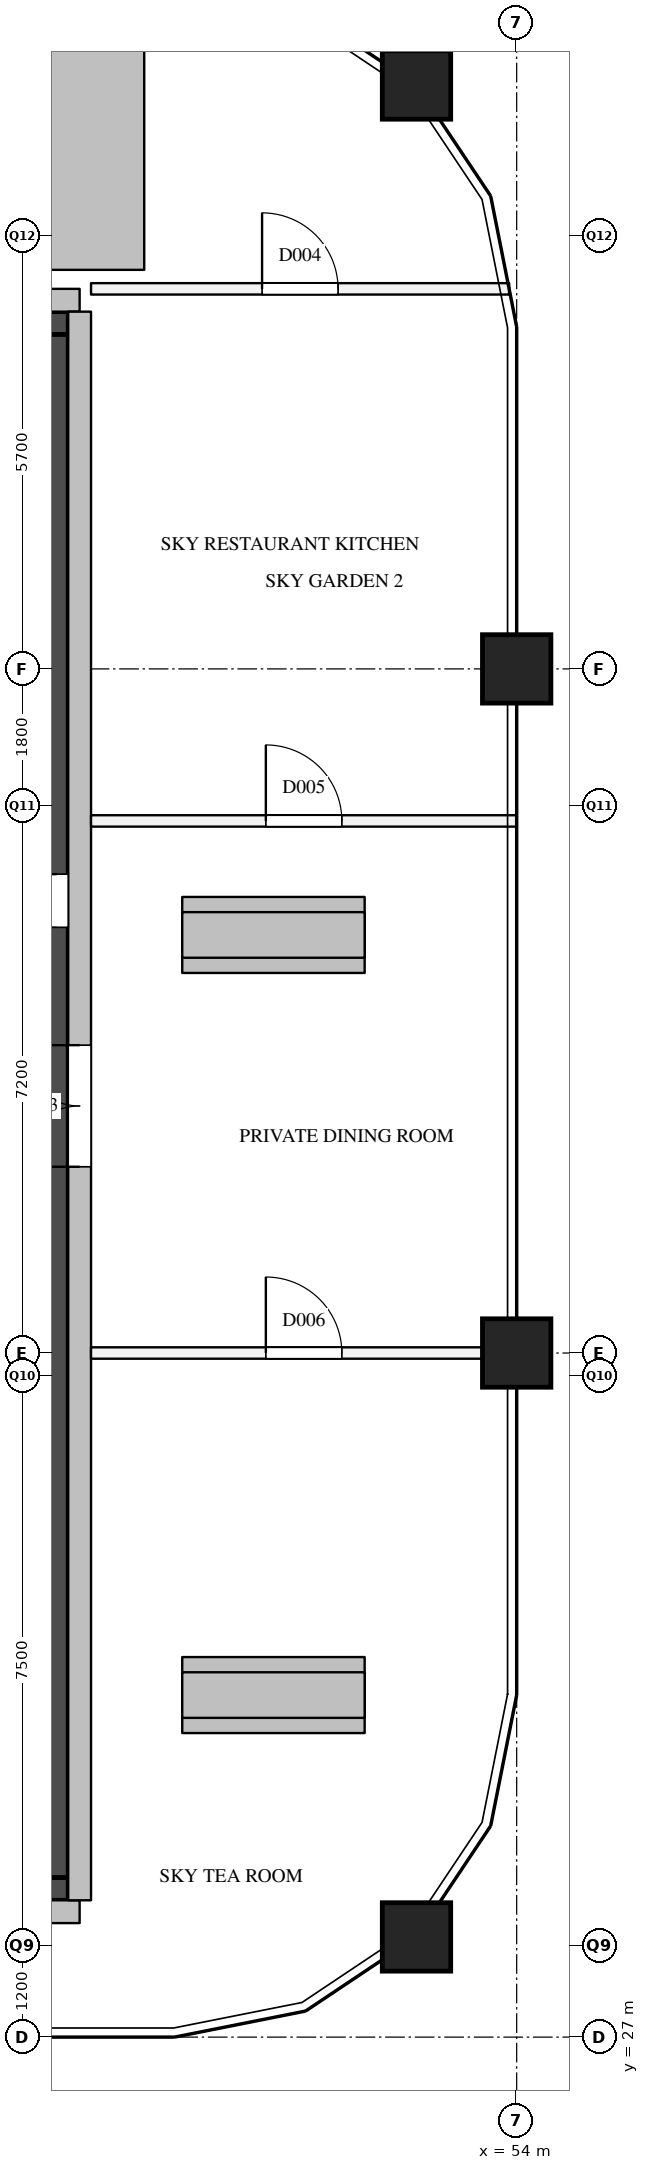
"""IFC4 building model, lengths in metres.
Left out: names, types, materials, properties, quantities, classifications, styles, units other than length and angle.
Written with IfcOpenShell. Run it as: python <this file> out.ifc"""

import sys

from ifc_helpers import new_model, si_unit, direction, frame, frame_2d, origin, origin_2d, place, context, subcontext, project, spatial, rectangle, extrude, element, fill, save


model = new_model("IFC4")
c1 = context("Model", 3, precision=1e-05, world=origin(), true_north=direction((0.0, 1.0)))
c2 = subcontext(c1, "Body", "Model", "MODEL_VIEW")
j1 = project(units=[si_unit("LENGTHUNIT", "METRE"), si_unit("PLANEANGLEUNIT", "RADIAN")], contexts=[c1])
p1 = place(None, origin())
s1 = spatial("IfcSite", under=j1, at=p1, CompositionType="ELEMENT")
p2 = place(p1, origin())
s2 = spatial("IfcBuilding", under=s1, at=p2, CompositionType="ELEMENT")
p3 = place(p2, frame((0.0, 0.0, 320.7)))
s3 = spatial("IfcBuildingStorey", under=s2, at=p3, CompositionType="ELEMENT", Elevation=320.7)
for number, where, z_axis, x_axis in (
    (1, (52.682, 28.318, 0.0), (0.0, 0.0, 1.0), (1.0, 0.0, 0.0)),
    (2, (54.0, 36.0, 0.0), (0.0, 0.0, 1.0), (1.0, 0.0, 0.0)),
    (3, (54.0, 45.0, 0.0), (0.0, 0.0, 1.0), (1.0, 0.0, 0.0)),
    (4, (52.682, 52.682, 0.0), (0.0, 0.0, 1.0), (1.0, 0.0, 0.0)),
):
    element("IfcColumn", number, at=place(p3, frame(where, z_axis=z_axis, x_axis=x_axis)), inside=s3, PredefinedType="COLUMN", context=c2, shape_type="SweptSolid", body=[
        extrude(rectangle(XDim=0.9, YDim=0.9, at=origin_2d()), origin(), (0.0, 0.0, 1.0), 4.5),
    ])
p4 = place(p3, frame((49.6, 31.5, 4.5), z_axis=(0.0, 0.0, 1.0), x_axis=(1.0, 0.0, 0.0)))
e5 = element("IfcWall", 5, at=p4, inside=s3, PredefinedType="SOLIDWALL", context=c2, shape_type="SweptSolid", body=[
    extrude(rectangle(XDim=2.4, YDim=1.0, at=frame_2d((1.2, 0.0))), origin(), (0.0, 0.0, 1.0), 0.45),
])
p5 = place(p3, frame((49.6, 41.5, 4.5), z_axis=(0.0, 0.0, 1.0), x_axis=(1.0, 0.0, 0.0)))
e6 = element("IfcWall", 6, at=p5, inside=s3, PredefinedType="SOLIDWALL", context=c2, shape_type="SweptSolid", body=[
    extrude(rectangle(XDim=2.4, YDim=1.0, at=frame_2d((1.2, 0.0))), origin(), (0.0, 0.0, 1.0), 1.35),
])
p6 = place(p3, frame((45.5, 51.75, 5.1), z_axis=(0.0, 0.0, 1.0), x_axis=(1.0, 0.0, 0.0)))
e7 = element("IfcWall", 7, at=p6, inside=s3, PredefinedType="SOLIDWALL", context=c2, shape_type="SweptSolid", body=[
    extrude(rectangle(XDim=3.6, YDim=3.0, at=frame_2d((1.8, 0.0))), origin(), (0.0, 0.0, 1.0), 2.6),
])
for number, where, z_axis, x_axis in (
    (8, (36.15, 28.65, 4.5), (0.0, 0.0, 1.0), (1.0, 0.0, 0.0)),
    (9, (36.15, 49.85, 4.5), (0.0, 0.0, 1.0), (1.0, 0.0, 0.0)),
):
    element("IfcWall", number, at=place(p3, frame(where, z_axis=z_axis, x_axis=x_axis)), inside=s3, PredefinedType="SOLIDWALL", context=c2, shape_type="SweptSolid", body=[
        extrude(rectangle(XDim=12.1, YDim=0.3, at=frame_2d((6.05, 0.0))), origin(), (0.0, 0.0, 1.0), 3.6),
    ])
p7 = place(p3, frame((48.25, 28.8, 4.5), z_axis=(0.0, 0.0, 1.0), x_axis=(0.0, 1.0, 0.0)))
e10 = element("IfcWall", 10, at=p7, inside=s3, PredefinedType="SOLIDWALL", context=c2, shape_type="SweptSolid", body=[
    extrude(rectangle(XDim=20.9, YDim=0.3, at=frame_2d((10.45, 0.0))), origin(), (0.0, 0.0, 1.0), 3.6),
])
p8 = place(p7, frame((9.65, 0.0, 0.0)))
e11 = element("IfcOpeningElement", 11, at=p8, cuts=e10, PredefinedType="OPENING", context=c2, shape_type="SweptSolid", body=[
    extrude(rectangle(XDim=1.6, YDim=2.4, at=frame_2d((0.8, 1.2))), frame((0.0, 0.16, 0.0), z_axis=(0.0, -1.0, 0.0), x_axis=(1.0, 0.0, 0.0)), (0.0, 0.0, 1.0), 0.32),
])
for number, where, z_axis, x_axis in (
    (12, (49.6, 31.5, 4.95), (0.0, 0.0, 1.0), (1.0, 0.0, 0.0)),
    (13, (49.6, 41.5, 5.85), (0.0, 0.0, 1.0), (1.0, 0.0, 0.0)),
):
    element("IfcWall", number, at=place(p3, frame(where, z_axis=z_axis, x_axis=x_axis)), inside=s3, PredefinedType="SOLIDWALL", context=c2, shape_type="SweptSolid", body=[
        extrude(rectangle(XDim=2.4, YDim=0.6, at=frame_2d((1.2, 0.0))), origin(), (0.0, 0.0, 1.0), 0.75),
    ])
p9 = place(p3, frame((36.3, 28.95, 0.0), z_axis=(0.0, 0.0, 1.0), x_axis=(1.0, 0.0, 0.0)))
e14 = element("IfcWall", 14, at=p9, inside=s3, PredefinedType="SHEAR", context=c2, shape_type="SweptSolid", body=[
    extrude(rectangle(XDim=11.8, YDim=0.3, at=frame_2d((5.9, 0.0))), origin(), (0.0, 0.0, 1.0), 3.95),
])
p10 = place(p9, frame((0.75, 0.0, 0.0)))
e15 = element("IfcOpeningElement", 15, at=p10, cuts=e14, PredefinedType="OPENING", context=c2, shape_type="SweptSolid", body=[
    extrude(rectangle(XDim=1.2, YDim=2.1, at=frame_2d((0.6, 1.05))), frame((0.0, 0.16, 0.0), z_axis=(0.0, -1.0, 0.0), x_axis=(1.0, 0.0, 0.0)), (0.0, 0.0, 1.0), 0.32),
])
p11 = place(p9, frame((2.85, 0.0, 0.0)))
e16 = element("IfcOpeningElement", 16, at=p11, cuts=e14, PredefinedType="OPENING", context=c2, shape_type="SweptSolid", body=[
    extrude(rectangle(XDim=1.2, YDim=2.1, at=frame_2d((0.6, 1.05))), frame((0.0, 0.16, 0.0), z_axis=(0.0, -1.0, 0.0), x_axis=(1.0, 0.0, 0.0)), (0.0, 0.0, 1.0), 0.32),
])
p12 = place(p9, frame((4.95, 0.0, 0.0)))
e17 = element("IfcOpeningElement", 17, at=p12, cuts=e14, PredefinedType="OPENING", context=c2, shape_type="SweptSolid", body=[
    extrude(rectangle(XDim=1.2, YDim=2.1, at=frame_2d((0.6, 1.05))), frame((0.0, 0.16, 0.0), z_axis=(0.0, -1.0, 0.0), x_axis=(1.0, 0.0, 0.0)), (0.0, 0.0, 1.0), 0.32),
])
p13 = place(p3, frame((36.3, 49.55, 0.0), z_axis=(0.0, 0.0, 1.0), x_axis=(1.0, 0.0, 0.0)))
e18 = element("IfcWall", 18, at=p13, inside=s3, PredefinedType="SHEAR", context=c2, shape_type="SweptSolid", body=[
    extrude(rectangle(XDim=11.8, YDim=0.3, at=frame_2d((5.9, 0.0))), origin(), (0.0, 0.0, 1.0), 3.95),
])
p14 = place(p3, frame((47.95, 29.1, 0.0), z_axis=(0.0, 0.0, 1.0), x_axis=(0.0, 1.0, 0.0)))
e19 = element("IfcWall", 19, at=p14, inside=s3, PredefinedType="SHEAR", context=c2, shape_type="SweptSolid", body=[
    extrude(rectangle(XDim=20.3, YDim=0.3, at=frame_2d((10.15, 0.0))), origin(), (0.0, 0.0, 1.0), 3.95),
])
p15 = place(p14, frame((12.5, 0.0, 0.0)))
e20 = element("IfcOpeningElement", 20, at=p15, cuts=e19, PredefinedType="OPENING", context=c2, shape_type="SweptSolid", body=[
    extrude(rectangle(XDim=0.7, YDim=2.1, at=frame_2d((0.35, 1.05))), frame((0.0, 0.16, 0.0), z_axis=(0.0, -1.0, 0.0), x_axis=(1.0, 0.0, 0.0)), (0.0, 0.0, 1.0), 0.32),
])
p16 = place(p3, frame((48.4, 36.0, 0.0), z_axis=(0.0, 0.0, 1.0), x_axis=(1.0, 0.0, 0.0)))
e21 = element("IfcWall", 21, at=p16, inside=s3, PredefinedType="PARTITIONING", context=c2, shape_type="SweptSolid", body=[
    extrude(rectangle(XDim=5.6, YDim=0.15, at=frame_2d((2.8, 0.0))), origin(), (0.0, 0.0, 1.0), 3.95),
])
p17 = place(p16, frame((2.3, 0.0, 0.0)))
e22 = element("IfcOpeningElement", 22, at=p17, cuts=e21, PredefinedType="OPENING", context=c2, shape_type="SweptSolid", body=[
    extrude(rectangle(XDim=1.0, YDim=2.1, at=frame_2d((0.5, 1.05))), frame((0.0, 0.085, 0.0), z_axis=(0.0, -1.0, 0.0), x_axis=(1.0, 0.0, 0.0)), (0.0, 0.0, 1.0), 0.17),
])
p18 = place(p3, frame((48.4, 43.0, 0.0), z_axis=(0.0, 0.0, 1.0), x_axis=(1.0, 0.0, 0.0)))
e23 = element("IfcWall", 23, at=p18, inside=s3, PredefinedType="PARTITIONING", context=c2, shape_type="SweptSolid", body=[
    extrude(rectangle(XDim=5.6, YDim=0.15, at=frame_2d((2.8, 0.0))), origin(), (0.0, 0.0, 1.0), 2.95),
])
p19 = place(p18, frame((2.3, 0.0, 0.0)))
e24 = element("IfcOpeningElement", 24, at=p19, cuts=e23, PredefinedType="OPENING", context=c2, shape_type="SweptSolid", body=[
    extrude(rectangle(XDim=1.0, YDim=2.1, at=frame_2d((0.5, 1.05))), frame((0.0, 0.085, 0.0), z_axis=(0.0, -1.0, 0.0), x_axis=(1.0, 0.0, 0.0)), (0.0, 0.0, 1.0), 0.17),
])
p20 = place(p3, frame((48.4, 50.0, 0.0), z_axis=(0.0, 0.0, 1.0), x_axis=(1.0, 0.0, 0.0)))
e25 = element("IfcWall", 25, at=p20, inside=s3, PredefinedType="PARTITIONING", context=c2, shape_type="SweptSolid", body=[
    extrude(rectangle(XDim=5.5, YDim=0.15, at=frame_2d((2.75, 0.0))), origin(), (0.0, 0.0, 1.0), 2.95),
])
p21 = place(p20, frame((2.25, 0.0, 0.0)))
e26 = element("IfcOpeningElement", 26, at=p21, cuts=e25, PredefinedType="OPENING", context=c2, shape_type="SweptSolid", body=[
    extrude(rectangle(XDim=1.0, YDim=2.1, at=frame_2d((0.5, 1.05))), frame((0.0, 0.085, 0.0), z_axis=(0.0, -1.0, 0.0), x_axis=(1.0, 0.0, 0.0)), (0.0, 0.0, 1.0), 0.17),
])
p22 = place(p8, origin())
e27 = element("IfcDoor", 27, at=p22, inside=s3, OperationType="DOUBLE_DOOR_SINGLE_SWING", PredefinedType="DOOR", context=c2, shape_type="SweptSolid", body=[
    extrude(rectangle(XDim=1.6, YDim=2.4, at=frame_2d((0.8, 1.2))), frame((0.0, 0.025, 0.0), z_axis=(0.0, -1.0, 0.0), x_axis=(1.0, 0.0, 0.0)), (0.0, 0.0, 1.0), 0.05),
])
fill(e11, e27)
p23 = place(p15, origin())
e28 = element("IfcDoor", 28, at=p23, inside=s3, OperationType="SINGLE_SWING_RIGHT", PredefinedType="DOOR", context=c2, shape_type="SweptSolid", body=[
    extrude(rectangle(XDim=0.7, YDim=2.1, at=frame_2d((0.35, 1.05))), frame((0.0, 0.025, 0.0), z_axis=(0.0, -1.0, 0.0), x_axis=(1.0, 0.0, 0.0)), (0.0, 0.0, 1.0), 0.05),
])
fill(e20, e28)
p24 = place(p21, origin())
e29 = element("IfcDoor", 29, at=p24, inside=s3, OperationType="SINGLE_SWING_LEFT", PredefinedType="DOOR", context=c2, shape_type="SweptSolid", body=[
    extrude(rectangle(XDim=1.0, YDim=2.1, at=frame_2d((0.5, 1.05))), frame((0.0, 0.025, 0.0), z_axis=(0.0, -1.0, 0.0), x_axis=(1.0, 0.0, 0.0)), (0.0, 0.0, 1.0), 0.05),
])
fill(e26, e29)
p25 = place(p19, origin())
e30 = element("IfcDoor", 30, at=p25, inside=s3, OperationType="SINGLE_SWING_LEFT", PredefinedType="DOOR", context=c2, shape_type="SweptSolid", body=[
    extrude(rectangle(XDim=1.0, YDim=2.1, at=frame_2d((0.5, 1.05))), frame((0.0, 0.025, 0.0), z_axis=(0.0, -1.0, 0.0), x_axis=(1.0, 0.0, 0.0)), (0.0, 0.0, 1.0), 0.05),
])
fill(e24, e30)
p26 = place(p17, origin())
e31 = element("IfcDoor", 31, at=p26, inside=s3, OperationType="SINGLE_SWING_LEFT", PredefinedType="DOOR", context=c2, shape_type="SweptSolid", body=[
    extrude(rectangle(XDim=1.0, YDim=2.1, at=frame_2d((0.5, 1.05))), frame((0.0, 0.025, 0.0), z_axis=(0.0, -1.0, 0.0), x_axis=(1.0, 0.0, 0.0)), (0.0, 0.0, 1.0), 0.05),
])
fill(e22, e31)
save(model, sys.argv[1])
